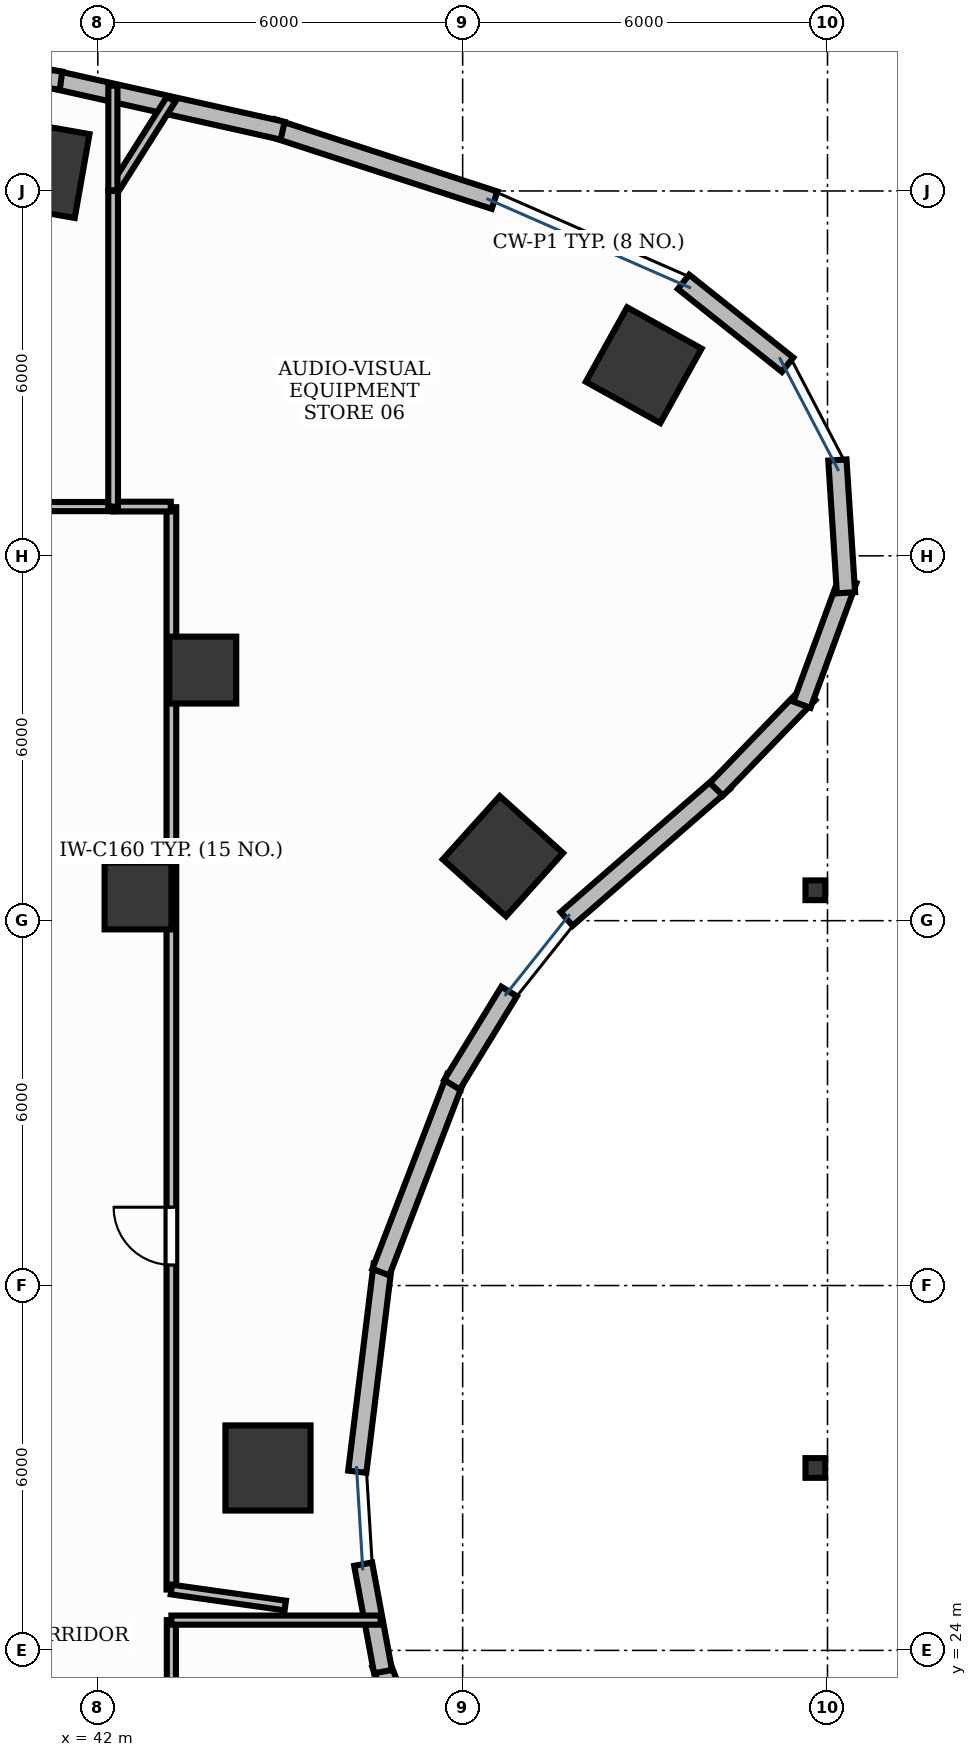
"""IFC4 building model, lengths in metres.
Left out: names, types, materials, properties, quantities, classifications, styles, units other than length and angle.
Written with IfcOpenShell. Run it as: python <this file> out.ifc"""

import sys

from ifc_helpers import new_model, si_unit, direction, frame, frame_2d, origin, origin_2d, place, context, subcontext, project, spatial, rectangle, hollow_circle, extrude, element, fill, save


model = new_model("IFC4")
c1 = context("Model", 3, precision=1e-05, world=origin(), true_north=direction((0.0, 1.0)))
c2 = subcontext(c1, "Body", "Model", "MODEL_VIEW")
j1 = project(units=[si_unit("LENGTHUNIT", "METRE"), si_unit("PLANEANGLEUNIT", "RADIAN")], contexts=[c1])
p1 = place(None, origin())
s1 = spatial("IfcSite", under=j1, at=p1, CompositionType="ELEMENT")
p2 = place(p1, origin())
s2 = spatial("IfcBuilding", under=s1, at=p2, CompositionType="ELEMENT")
p3 = place(p2, frame((0.0, 0.0, 15.0)))
s3 = spatial("IfcBuildingStorey", under=s2, at=p3, CompositionType="ELEMENT", Elevation=15.0)
p4 = place(p3, frame((50.977, 45.135, -0.0), z_axis=(0.0, 0.0, 1.0), x_axis=(-0.874535078577, 0.484962262797, 0.0)))
e1 = element("IfcColumn", 1, at=p4, inside=s3, PredefinedType="COLUMN", context=c2, shape_type="SweptSolid", body=[
    extrude(rectangle(XDim=1.4, YDim=1.4, at=origin_2d()), origin(), (0.0, 0.0, 1.0), 5.051),
])
p5 = place(p3, frame((43.727, 40.121, -0.0), z_axis=(0.0, 0.0, 1.0), x_axis=(1.0, 0.0, 0.0)))
e2 = element("IfcColumn", 2, at=p5, inside=s3, PredefinedType="COLUMN", context=c2, shape_type="SweptSolid", body=[
    extrude(rectangle(XDim=1.1, YDim=1.1, at=origin_2d()), origin(), (0.0, 0.0, 1.0), 5.051),
])
for number, where, z_axis, x_axis in (
    (3, (41.052, 48.367, -0.0), (0.0, 0.0, 1.0), (-0.985, 0.173, 0.0)),
    (4, (44.799, 27.0, -0.0), (0.0, 0.0, 1.0), (0.0, 1.0, 0.0)),
    (5, (48.662, 37.061, -0.0), (0.0, 0.0, 1.0), (0.669, 0.743, 0.0)),
):
    element("IfcColumn", number, at=place(p3, frame(where, z_axis=z_axis, x_axis=x_axis)), inside=s3, PredefinedType="COLUMN", context=c2, shape_type="SweptSolid", body=[
        extrude(rectangle(XDim=1.4, YDim=1.4, at=origin_2d()), origin(), (0.0, 0.0, 1.0), 5.051),
    ])
p6 = place(p3, frame((42.662, 36.407, -0.0), z_axis=(0.0, 0.0, 1.0), x_axis=(1.0, 0.0, 0.0)))
e6 = element("IfcColumn", 6, at=p6, inside=s3, PredefinedType="COLUMN", context=c2, shape_type="SweptSolid", body=[
    extrude(rectangle(XDim=1.1, YDim=1.1, at=origin_2d()), origin(), (0.0, 0.0, 1.0), 5.051),
])
for number, where, z_axis, x_axis in (
    (7, (53.8, 27.0, 0.0), (0.0, 0.0, 1.0), (1.0, 0.0, 0.0)),
    (8, (53.8, 36.5, 0.0), (0.0, 0.0, 1.0), (1.0, 0.0, 0.0)),
):
    element("IfcColumn", number, at=place(p3, frame(where, z_axis=z_axis, x_axis=x_axis)), inside=s3, PredefinedType="COLUMN", context=c2, shape_type="SweptSolid", body=[
        extrude(hollow_circle(Radius=0.162, WallThickness=0.016, at=origin_2d()), origin(), (0.0, 0.0, 1.0), 5.051),
    ])
p7 = place(p3, frame((48.525, 47.849, 0.0), z_axis=(0.0, 0.0, 1.0), x_axis=(-0.950965833732, 0.309295947393, 0.0)))
e9 = element("IfcWall", 9, at=p7, inside=s3, PredefinedType="STANDARD", context=c2, shape_type="SweptSolid", body=[
    extrude(rectangle(XDim=3.84, YDim=0.3, at=frame_2d((1.92, 0.0))), origin(), (0.0, 0.0, 1.0), 5.05),
])
p8 = place(p3, frame((45.04, 48.991, 0.0), z_axis=(0.0, 0.0, 1.0), x_axis=(-0.975868573345, 0.218358713032, 0.0)))
e10 = element("IfcWall", 10, at=p8, inside=s3, PredefinedType="STANDARD", context=c2, shape_type="SweptSolid", body=[
    extrude(rectangle(XDim=3.909, YDim=0.3, at=frame_2d((1.954, 0.0))), origin(), (0.0, 0.0, 1.0), 5.05),
])
p9 = place(p3, frame((41.395, 49.815, 0.0), z_axis=(0.0, 0.0, 1.0), x_axis=(-0.991734095036, 0.128310111617, 0.0)))
e11 = element("IfcWall", 11, at=p9, inside=s3, PredefinedType="STANDARD", context=c2, shape_type="SweptSolid", body=[
    extrude(rectangle(XDim=3.956, YDim=0.3, at=frame_2d((1.978, 0.0))), origin(), (0.0, 0.0, 1.0), 5.05),
])
p10 = place(p3, frame((47.884, 20.577, 0.0), z_axis=(0.0, 0.0, 1.0), x_axis=(-0.358344570513, 0.933589400531, 0.0)))
e12 = element("IfcWall", 12, at=p10, inside=s3, PredefinedType="STANDARD", context=c2, shape_type="SweptSolid", body=[
    extrude(rectangle(XDim=3.43, YDim=0.3, at=frame_2d((1.715, 0.0))), origin(), (0.0, 0.0, 1.0), 5.05),
])
p11 = place(p3, frame((46.691, 23.65, 0.0), z_axis=(0.0, 0.0, 1.0), x_axis=(-0.182230271073, 0.983255881399, 0.0)))
e13 = element("IfcWall", 13, at=p11, inside=s3, PredefinedType="STANDARD", context=c2, shape_type="SweptSolid", body=[
    extrude(rectangle(XDim=1.798, YDim=0.3, at=frame_2d((0.899, 0.0))), origin(), (0.0, 0.0, 1.0), 5.05),
])
p12 = place(p3, frame((46.267, 26.938, 0.0), z_axis=(0.0, 0.0, 1.0), x_axis=(0.121870386032, 0.992546023622, 0.0)))
e14 = element("IfcWall", 14, at=p12, inside=s3, PredefinedType="STANDARD", context=c2, shape_type="SweptSolid", body=[
    extrude(rectangle(XDim=3.43, YDim=0.3, at=frame_2d((1.715, 0.0))), origin(), (0.0, 0.0, 1.0), 3.375),
])
p13 = place(p3, frame((46.655, 30.221, 0.0), z_axis=(0.0, 0.0, 1.0), x_axis=(0.358344570513, 0.933589400531, 0.0)))
e15 = element("IfcWall", 15, at=p13, inside=s3, PredefinedType="STANDARD", context=c2, shape_type="SweptSolid", body=[
    extrude(rectangle(XDim=3.43, YDim=0.3, at=frame_2d((1.715, 0.0))), origin(), (0.0, 0.0, 1.0), 5.05),
])
p14 = place(p3, frame((47.825, 33.303, 0.0), z_axis=(0.0, 0.0, 1.0), x_axis=(0.522520662875, 0.852626622191, 0.0)))
e16 = element("IfcWall", 16, at=p14, inside=s3, PredefinedType="STANDARD", context=c2, shape_type="SweptSolid", body=[
    extrude(rectangle(XDim=1.798, YDim=0.3, at=frame_2d((0.899, 0.0))), origin(), (0.0, 0.0, 1.0), 5.05),
])
p15 = place(p3, frame((49.709, 36.029, 0.0), z_axis=(0.0, 0.0, 1.0), x_axis=(0.754746490246, 0.656016566454, 0.0)))
e17 = element("IfcWall", 17, at=p15, inside=s3, PredefinedType="STANDARD", context=c2, shape_type="SweptSolid", body=[
    extrude(rectangle(XDim=3.43, YDim=0.3, at=frame_2d((1.715, 0.0))), origin(), (0.0, 0.0, 1.0), 3.375),
])
p16 = place(p3, frame((52.173, 38.161, 0.0), z_axis=(0.0, 0.0, 1.0), x_axis=(0.695404695719, 0.718618333451, 0.0)))
e18 = element("IfcWall", 18, at=p16, inside=s3, PredefinedType="STANDARD", context=c2, shape_type="SweptSolid", body=[
    extrude(rectangle(XDim=2.188, YDim=0.3, at=frame_2d((1.094, 0.0))), origin(), (0.0, 0.0, 1.0), 5.05),
])
for number, where, z_axis, x_axis in (
    (19, (53.58, 39.552, 0.0), (0.0, 0.0, 1.0), (0.345, 0.939, 0.0)),
    (20, (54.304, 41.393, 0.0), (0.0, 0.0, 1.0), (-0.065, 0.998, 0.0)),
    (21, (53.344, 45.143, 0.0), (0.0, 0.0, 1.0), (-0.782, 0.623, 0.0)),
):
    element("IfcWall", number, at=place(p3, frame(where, z_axis=z_axis, x_axis=x_axis)), inside=s3, PredefinedType="STANDARD", context=c2, shape_type="SweptSolid", body=[
        extrude(rectangle(XDim=2.188, YDim=0.3, at=frame_2d((1.094, 0.0))), origin(), (0.0, 0.0, 1.0), 5.05),
    ])
p17 = place(p3, frame((43.21, 12.968, 0.0), z_axis=(0.0, 0.0, 1.0), x_axis=(0.0, 1.0, 0.0)))
e22 = element("IfcWall", 22, at=p17, inside=s3, PredefinedType="PARTITIONING", context=c2, shape_type="SweptSolid", body=[
    extrude(rectangle(XDim=11.53, YDim=0.15, at=frame_2d((5.765, 0.0))), origin(), (0.0, 0.0, 1.0), 3.36),
])
p18 = place(p17, frame((8.333, 0.0, 0.0)))
e23 = element("IfcOpeningElement", 23, at=p18, cuts=e22, PredefinedType="OPENING", context=c2, shape_type="SweptSolid", body=[
    extrude(rectangle(XDim=0.95, YDim=2.15, at=frame_2d((0.475, 1.075))), frame((0.0, 0.09, 0.0), z_axis=(0.0, -1.0, 0.0), x_axis=(1.0, 0.0, 0.0)), (0.0, 0.0, 1.0), 0.18),
])
p19 = place(p3, frame((43.21, 25.001, 0.0), z_axis=(0.0, 0.0, 1.0), x_axis=(0.0, 1.0, 0.0)))
e24 = element("IfcWall", 24, at=p19, inside=s3, PredefinedType="PARTITIONING", context=c2, shape_type="SweptSolid", body=[
    extrude(rectangle(XDim=17.799, YDim=0.16, at=frame_2d((8.899, 0.0))), origin(), (0.0, 0.0, 1.0), 3.36),
])
p20 = place(p19, frame((5.337, 0.0, 0.0)))
e25 = element("IfcOpeningElement", 25, at=p20, cuts=e24, PredefinedType="OPENING", context=c2, shape_type="SweptSolid", body=[
    extrude(rectangle(XDim=0.95, YDim=2.15, at=frame_2d((0.475, 1.075))), frame((0.0, 0.095, 0.0), z_axis=(0.0, -1.0, 0.0), x_axis=(1.0, 0.0, 0.0)), (0.0, 0.0, 1.0), 0.19),
])
p21 = place(p3, frame((42.242, 42.81, 0.0), z_axis=(0.0, 0.0, 1.0), x_axis=(-1.0, 0.0, 0.0)))
e26 = element("IfcWall", 26, at=p21, inside=s3, PredefinedType="PARTITIONING", context=c2, shape_type="SweptSolid", body=[
    extrude(rectangle(XDim=13.874, YDim=0.15, at=frame_2d((6.937, 0.0))), origin(), (0.0, 0.0, 1.0), 3.36),
])
p22 = place(p21, frame((6.688, 0.0, 0.0)))
e27 = element("IfcOpeningElement", 27, at=p22, cuts=e26, PredefinedType="OPENING", context=c2, shape_type="SweptSolid", body=[
    extrude(rectangle(XDim=0.95, YDim=2.15, at=frame_2d((0.475, 1.075))), frame((0.0, 0.09, 0.0), z_axis=(0.0, -1.0, 0.0), x_axis=(1.0, 0.0, 0.0)), (0.0, 0.0, 1.0), 0.18),
])
p23 = place(p3, frame((43.21, 24.498, 0.0), z_axis=(0.0, 0.0, 1.0), x_axis=(1.0, 0.0, 0.0)))
e28 = element("IfcWall", 28, at=p23, inside=s3, PredefinedType="PARTITIONING", context=c2, shape_type="SweptSolid", body=[
    extrude(rectangle(XDim=3.442, YDim=0.15, at=frame_2d((1.721, 0.0))), origin(), (0.0, 0.0, 1.0), 3.36),
])
p24 = place(p3, frame((42.252, 48.001, 0.0), z_axis=(0.0, 0.0, 1.0), x_axis=(0.534286529928, 0.845303438972, 0.0)))
e29 = element("IfcWall", 29, at=p24, inside=s3, PredefinedType="PARTITIONING", context=c2, shape_type="SweptSolid", body=[
    extrude(rectangle(XDim=1.783, YDim=0.16, at=frame_2d((0.892, 0.0))), origin(), (0.0, 0.0, 1.0), 3.36),
])
p25 = place(p3, frame((45.083, 24.738, 0.0), z_axis=(0.0, 0.0, 1.0), x_axis=(-0.99027214707, 0.139144079059, 0.0)))
e30 = element("IfcWall", 30, at=p25, inside=s3, PredefinedType="PARTITIONING", context=c2, shape_type="SweptSolid", body=[
    extrude(rectangle(XDim=1.891, YDim=0.16, at=frame_2d((0.946, 0.0))), origin(), (0.0, 0.0, 1.0), 3.36),
])
p26 = place(p3, frame((43.2, 42.81, 0.0), z_axis=(0.0, 0.0, 1.0), x_axis=(-1.0, 0.0, 0.0)))
e31 = element("IfcWall", 31, at=p26, inside=s3, PredefinedType="PARTITIONING", context=c2, shape_type="SweptSolid", body=[
    extrude(rectangle(XDim=0.948, YDim=0.16, at=frame_2d((0.474, 0.0))), origin(), (0.0, 0.0, 1.0), 3.36),
])
p27 = place(p3, frame((42.252, 42.81, 0.0), z_axis=(0.0, 0.0, 1.0), x_axis=(0.0, 1.0, 0.0)))
e32 = element("IfcWall", 32, at=p27, inside=s3, PredefinedType="PARTITIONING", context=c2, shape_type="SweptSolid", body=[
    extrude(rectangle(XDim=5.19, YDim=0.16, at=frame_2d((2.595, 0.0))), origin(), (0.0, 0.0, 1.0), 3.36),
])
p28 = place(p3, frame((42.248, 49.732, 0.0), z_axis=(0.0, 0.0, 1.0), x_axis=(0.0, -1.0, 0.0)))
e33 = element("IfcWall", 33, at=p28, inside=s3, PredefinedType="PARTITIONING", context=c2, shape_type="SweptSolid", body=[
    extrude(rectangle(XDim=1.719, YDim=0.15, at=frame_2d((0.86, 0.0))), origin(), (0.0, 0.0, 1.0), 3.36),
])
p29 = place(p20, origin())
e34 = element("IfcDoor", 34, at=p29, inside=s3, OperationType="SINGLE_SWING_RIGHT", PredefinedType="DOOR", context=c2, shape_type="SweptSolid", body=[
    extrude(rectangle(XDim=0.95, YDim=2.15, at=frame_2d((0.475, 1.075))), frame((0.0, 0.025, 0.0), z_axis=(0.0, -1.0, 0.0), x_axis=(1.0, 0.0, 0.0)), (0.0, 0.0, 1.0), 0.05),
])
fill(e25, e34)
save(model, sys.argv[1])
